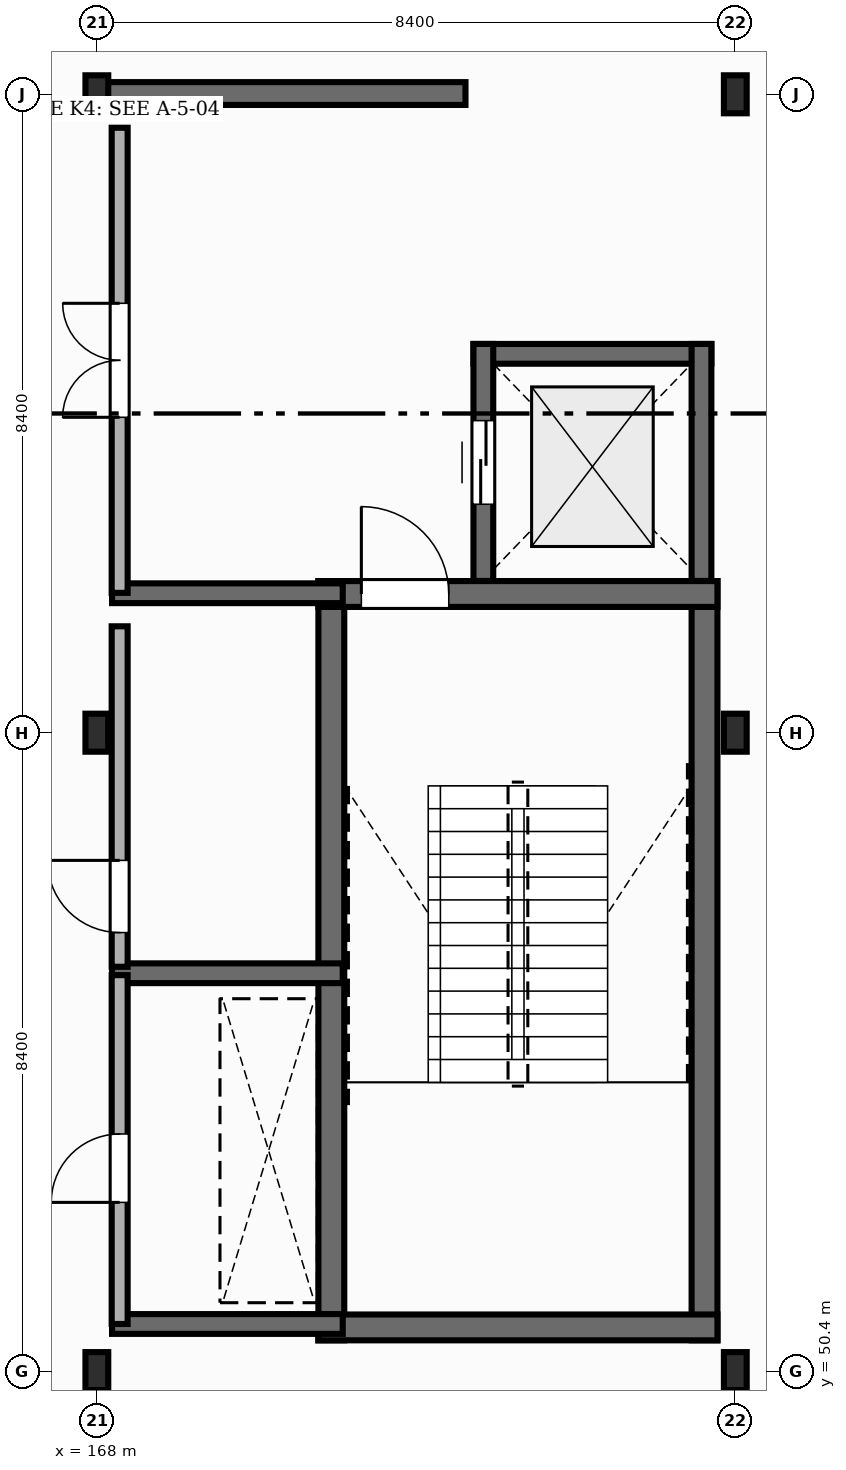
"""IFC4 building model, lengths in metres.
Left out: names, types, materials, properties, quantities, classifications, styles, units other than length and angle.
Written with IfcOpenShell. Run it as: python <this file> out.ifc"""

import sys

from ifc_helpers import new_model, si_unit, direction, frame, frame_2d, origin, origin_2d, place, context, subcontext, project, spatial, rectangle, i_section, extrude, element, fill, save


model = new_model("IFC4")
c1 = context("Model", 3, precision=1e-05, world=origin(), true_north=direction((0.0, 1.0)))
c2 = subcontext(c1, "Body", "Model", "MODEL_VIEW")
j1 = project(units=[si_unit("LENGTHUNIT", "METRE"), si_unit("PLANEANGLEUNIT", "RADIAN")], contexts=[c1])
p1 = place(None, origin())
s1 = spatial("IfcSite", under=j1, at=p1, CompositionType="ELEMENT")
p2 = place(p1, origin())
s2 = spatial("IfcBuilding", under=s1, at=p2, CompositionType="ELEMENT")
p3 = place(p2, frame((0.0, 0.0, 5.4)))
s3 = spatial("IfcBuildingStorey", under=s2, at=p3, CompositionType="ELEMENT", Elevation=5.4)
for number, where, z_axis, x_axis in (
    (1, (168.0, 50.4, 0.0), (0.0, 0.0, 1.0), (1.0, 0.0, 0.0)),
    (2, (168.0, 58.8, 0.0), (0.0, 0.0, 1.0), (1.0, 0.0, 0.0)),
    (3, (168.0, 67.2, 0.0), (0.0, 0.0, 1.0), (1.0, 0.0, 0.0)),
    (4, (176.4, 50.4, 0.0), (0.0, 0.0, 1.0), (1.0, 0.0, 0.0)),
    (5, (176.4, 58.8, 0.0), (0.0, 0.0, 1.0), (1.0, 0.0, 0.0)),
    (6, (176.4, 67.2, 0.0), (0.0, 0.0, 1.0), (1.0, 0.0, 0.0)),
):
    element("IfcColumn", number, at=place(p3, frame(where, z_axis=z_axis, x_axis=x_axis)), inside=s3, PredefinedType="COLUMN", context=c2, shape_type="SweptSolid", body=[
        extrude(i_section(OverallWidth=0.3, OverallDepth=0.5, WebThickness=0.014, FlangeThickness=0.028, FilletRadius=0.027, at=origin_2d()), origin(), (0.0, 0.0, 1.0), 4.5),
    ])
for number, where, z_axis, x_axis in (
    (7, (171.085, 50.805, 0.0), (0.0, 0.0, 1.0), (0.0, 1.0, 0.0)),
    (8, (175.995, 50.805, 0.0), (0.0, 0.0, 1.0), (0.0, 1.0, 0.0)),
):
    element("IfcWall", number, at=place(p3, frame(where, z_axis=z_axis, x_axis=x_axis)), inside=s3, PredefinedType="SHEAR", context=c2, shape_type="SweptSolid", body=[
        extrude(rectangle(XDim=9.99, YDim=0.34, at=frame_2d((4.995, 0.0))), origin(), (0.0, 0.0, 1.0), 4.29),
    ])
p4 = place(p3, frame((170.915, 50.975, 0.0), z_axis=(0.0, 0.0, 1.0), x_axis=(1.0, 0.0, 0.0)))
e9 = element("IfcWall", 9, at=p4, inside=s3, PredefinedType="SHEAR", context=c2, shape_type="SweptSolid", body=[
    extrude(rectangle(XDim=5.25, YDim=0.34, at=frame_2d((2.625, 0.0))), origin(), (0.0, 0.0, 1.0), 4.29),
])
p5 = place(p3, frame((170.915, 60.625, 0.0), z_axis=(0.0, 0.0, 1.0), x_axis=(1.0, 0.0, 0.0)))
e10 = element("IfcWall", 10, at=p5, inside=s3, PredefinedType="SHEAR", context=c2, shape_type="SweptSolid", body=[
    extrude(rectangle(XDim=5.25, YDim=0.34, at=frame_2d((2.625, 0.0))), origin(), (0.0, 0.0, 1.0), 4.29),
])
p6 = place(p5, frame((0.565, 0.0, 0.0)))
e11 = element("IfcOpeningElement", 11, at=p6, cuts=e10, PredefinedType="OPENING", context=c2, shape_type="SweptSolid", body=[
    extrude(rectangle(XDim=1.15, YDim=2.15, at=frame_2d((0.575, 1.075))), frame((0.0, 0.18, 0.0), z_axis=(0.0, -1.0, 0.0), x_axis=(1.0, 0.0, 0.0)), (0.0, 0.0, 1.0), 0.36),
])
p7 = place(p3, frame((172.955, 63.785, 0.0), z_axis=(0.0, 0.0, 1.0), x_axis=(1.0, 0.0, 0.0)))
e12 = element("IfcWall", 12, at=p7, inside=s3, PredefinedType="SHEAR", context=c2, shape_type="SweptSolid", body=[
    extrude(rectangle(XDim=3.13, YDim=0.26, at=frame_2d((1.565, 0.0))), origin(), (0.0, 0.0, 1.0), 4.29),
])
p8 = place(p3, frame((175.955, 60.797, 0.0), z_axis=(0.0, 0.0, 1.0), x_axis=(0.0, 1.0, 0.0)))
e13 = element("IfcWall", 13, at=p8, inside=s3, PredefinedType="SHEAR", context=c2, shape_type="SweptSolid", body=[
    extrude(rectangle(XDim=3.118, YDim=0.26, at=frame_2d((1.559, 0.0))), origin(), (0.0, 0.0, 1.0), 4.29),
])
p9 = place(p3, frame((173.085, 60.797, 0.0), z_axis=(0.0, 0.0, 1.0), x_axis=(0.0, 1.0, 0.0)))
e14 = element("IfcWall", 14, at=p9, inside=s3, PredefinedType="SHEAR", context=c2, shape_type="SweptSolid", body=[
    extrude(rectangle(XDim=3.118, YDim=0.26, at=frame_2d((1.559, 0.0))), origin(), (0.0, 0.0, 1.0), 4.29),
])
p10 = place(p9, frame((1.009, 0.0, 0.0)))
e15 = element("IfcOpeningElement", 15, at=p10, cuts=e14, PredefinedType="OPENING", context=c2, shape_type="SweptSolid", body=[
    extrude(rectangle(XDim=1.1, YDim=2.15, at=frame_2d((0.55, 1.075))), frame((0.0, 0.14, 0.0), z_axis=(0.0, -1.0, 0.0), x_axis=(1.0, 0.0, 0.0)), (0.0, 0.0, 1.0), 0.28),
])
for number, where, z_axis, x_axis in (
    (16, (168.2, 51.02, 0.0), (0.0, 0.0, 1.0), (1.0, 0.0, 0.0)),
    (17, (168.2, 55.635, 0.0), (0.0, 0.0, 1.0), (1.0, 0.0, 0.0)),
    (18, (168.2, 60.635, 0.0), (0.0, 0.0, 1.0), (1.0, 0.0, 0.0)),
):
    element("IfcWall", number, at=place(p3, frame(where, z_axis=z_axis, x_axis=x_axis)), inside=s3, PredefinedType="SHEAR", context=c2, shape_type="SweptSolid", body=[
        extrude(rectangle(XDim=3.035, YDim=0.26, at=frame_2d((1.518, 0.0))), origin(), (0.0, 0.0, 1.0), 4.29),
    ])
p11 = place(p3, frame((167.98, 67.21, 0.0), z_axis=(0.0, 0.0, 1.0), x_axis=(1.0, 0.0, 0.0)))
e19 = element("IfcWall", 19, at=p11, inside=s3, PredefinedType="SHEAR", context=c2, shape_type="SweptSolid", body=[
    extrude(rectangle(XDim=4.87, YDim=0.3, at=frame_2d((2.435, 0.0))), origin(), (0.0, 0.0, 1.0), 4.29),
])
p12 = place(p3, frame((168.3, 51.02, 0.0), z_axis=(0.0, 0.0, 1.0), x_axis=(0.0, 1.0, 0.0)))
e20 = element("IfcWall", 20, at=p12, inside=s3, PredefinedType="STANDARD", context=c2, shape_type="SweptSolid", body=[
    extrude(rectangle(XDim=4.59, YDim=0.21, at=frame_2d((2.295, 0.0))), origin(), (0.0, 0.0, 1.0), 3.972),
])
p13 = place(p12, frame((1.6, 0.0, 0.0)))
e21 = element("IfcOpeningElement", 21, at=p13, cuts=e20, PredefinedType="OPENING", context=c2, shape_type="SweptSolid", body=[
    extrude(rectangle(XDim=0.9, YDim=2.1, at=frame_2d((0.45, 1.05))), frame((0.0, 0.115, 0.0), z_axis=(0.0, -1.0, 0.0), x_axis=(1.0, 0.0, 0.0)), (0.0, 0.0, 1.0), 0.23),
])
p14 = place(p3, frame((168.3, 55.72, 0.0), z_axis=(0.0, 0.0, 1.0), x_axis=(0.0, 1.0, 0.0)))
e22 = element("IfcWall", 22, at=p14, inside=s3, PredefinedType="STANDARD", context=c2, shape_type="SweptSolid", body=[
    extrude(rectangle(XDim=4.48, YDim=0.21, at=frame_2d((2.24, 0.0))), origin(), (0.0, 0.0, 1.0), 3.682),
])
p15 = place(p14, frame((0.45, 0.0, 0.0)))
e23 = element("IfcOpeningElement", 23, at=p15, cuts=e22, PredefinedType="OPENING", context=c2, shape_type="SweptSolid", body=[
    extrude(rectangle(XDim=0.95, YDim=2.15, at=frame_2d((0.475, 1.075))), frame((0.0, 0.115, 0.0), z_axis=(0.0, -1.0, 0.0), x_axis=(1.0, 0.0, 0.0)), (0.0, 0.0, 1.0), 0.23),
])
p16 = place(p3, frame((168.3, 60.64, 0.0), z_axis=(0.0, 0.0, 1.0), x_axis=(0.0, 1.0, 0.0)))
e24 = element("IfcWall", 24, at=p16, inside=s3, PredefinedType="STANDARD", context=c2, shape_type="SweptSolid", body=[
    extrude(rectangle(XDim=6.12, YDim=0.21, at=frame_2d((3.06, 0.0))), origin(), (0.0, 0.0, 1.0), 3.682),
])
p17 = place(p16, frame((2.31, 0.0, 0.0)))
e25 = element("IfcOpeningElement", 25, at=p17, cuts=e24, PredefinedType="OPENING", context=c2, shape_type="SweptSolid", body=[
    extrude(rectangle(XDim=1.5, YDim=2.2, at=frame_2d((0.75, 1.1))), frame((0.0, 0.115, 0.0), z_axis=(0.0, -1.0, 0.0), x_axis=(1.0, 0.0, 0.0)), (0.0, 0.0, 1.0), 0.23),
])
p18 = place(p6, origin())
e26 = element("IfcDoor", 26, at=p18, inside=s3, OperationType="SINGLE_SWING_LEFT", PredefinedType="DOOR", context=c2, shape_type="SweptSolid", body=[
    extrude(rectangle(XDim=1.15, YDim=2.15, at=frame_2d((0.575, 1.075))), frame((0.0, 0.025, 0.0), z_axis=(0.0, -1.0, 0.0), x_axis=(1.0, 0.0, 0.0)), (0.0, 0.0, 1.0), 0.05),
])
fill(e11, e26)
p19 = place(p10, origin())
e27 = element("IfcDoor", 27, at=p19, inside=s3, OperationType="DOUBLE_DOOR_SLIDING", PredefinedType="DOOR", context=c2, shape_type="SweptSolid", body=[
    extrude(rectangle(XDim=1.1, YDim=2.15, at=frame_2d((0.55, 1.075))), frame((0.0, 0.025, 0.0), z_axis=(0.0, -1.0, 0.0), x_axis=(1.0, 0.0, 0.0)), (0.0, 0.0, 1.0), 0.05),
])
fill(e15, e27)
p20 = place(p13, origin())
e28 = element("IfcDoor", 28, at=p20, inside=s3, OperationType="SINGLE_SWING_LEFT", PredefinedType="DOOR", context=c2, shape_type="SweptSolid", body=[
    extrude(rectangle(XDim=0.9, YDim=2.1, at=frame_2d((0.45, 1.05))), frame((0.0, 0.025, 0.0), z_axis=(0.0, -1.0, 0.0), x_axis=(1.0, 0.0, 0.0)), (0.0, 0.0, 1.0), 0.05),
])
fill(e21, e28)
p21 = place(p15, origin())
e29 = element("IfcDoor", 29, at=p21, inside=s3, OperationType="SINGLE_SWING_RIGHT", PredefinedType="DOOR", context=c2, shape_type="SweptSolid", body=[
    extrude(rectangle(XDim=0.95, YDim=2.15, at=frame_2d((0.475, 1.075))), frame((0.0, 0.025, 0.0), z_axis=(0.0, -1.0, 0.0), x_axis=(1.0, 0.0, 0.0)), (0.0, 0.0, 1.0), 0.05),
])
fill(e23, e29)
p22 = place(p17, origin())
e30 = element("IfcDoor", 30, at=p22, inside=s3, OperationType="DOUBLE_DOOR_SINGLE_SWING", PredefinedType="DOOR", context=c2, shape_type="SweptSolid", body=[
    extrude(rectangle(XDim=1.5, YDim=2.2, at=frame_2d((0.75, 1.1))), frame((0.0, 0.025, 0.0), z_axis=(0.0, -1.0, 0.0), x_axis=(1.0, 0.0, 0.0)), (0.0, 0.0, 1.0), 0.05),
])
fill(e25, e30)
save(model, sys.argv[1])
